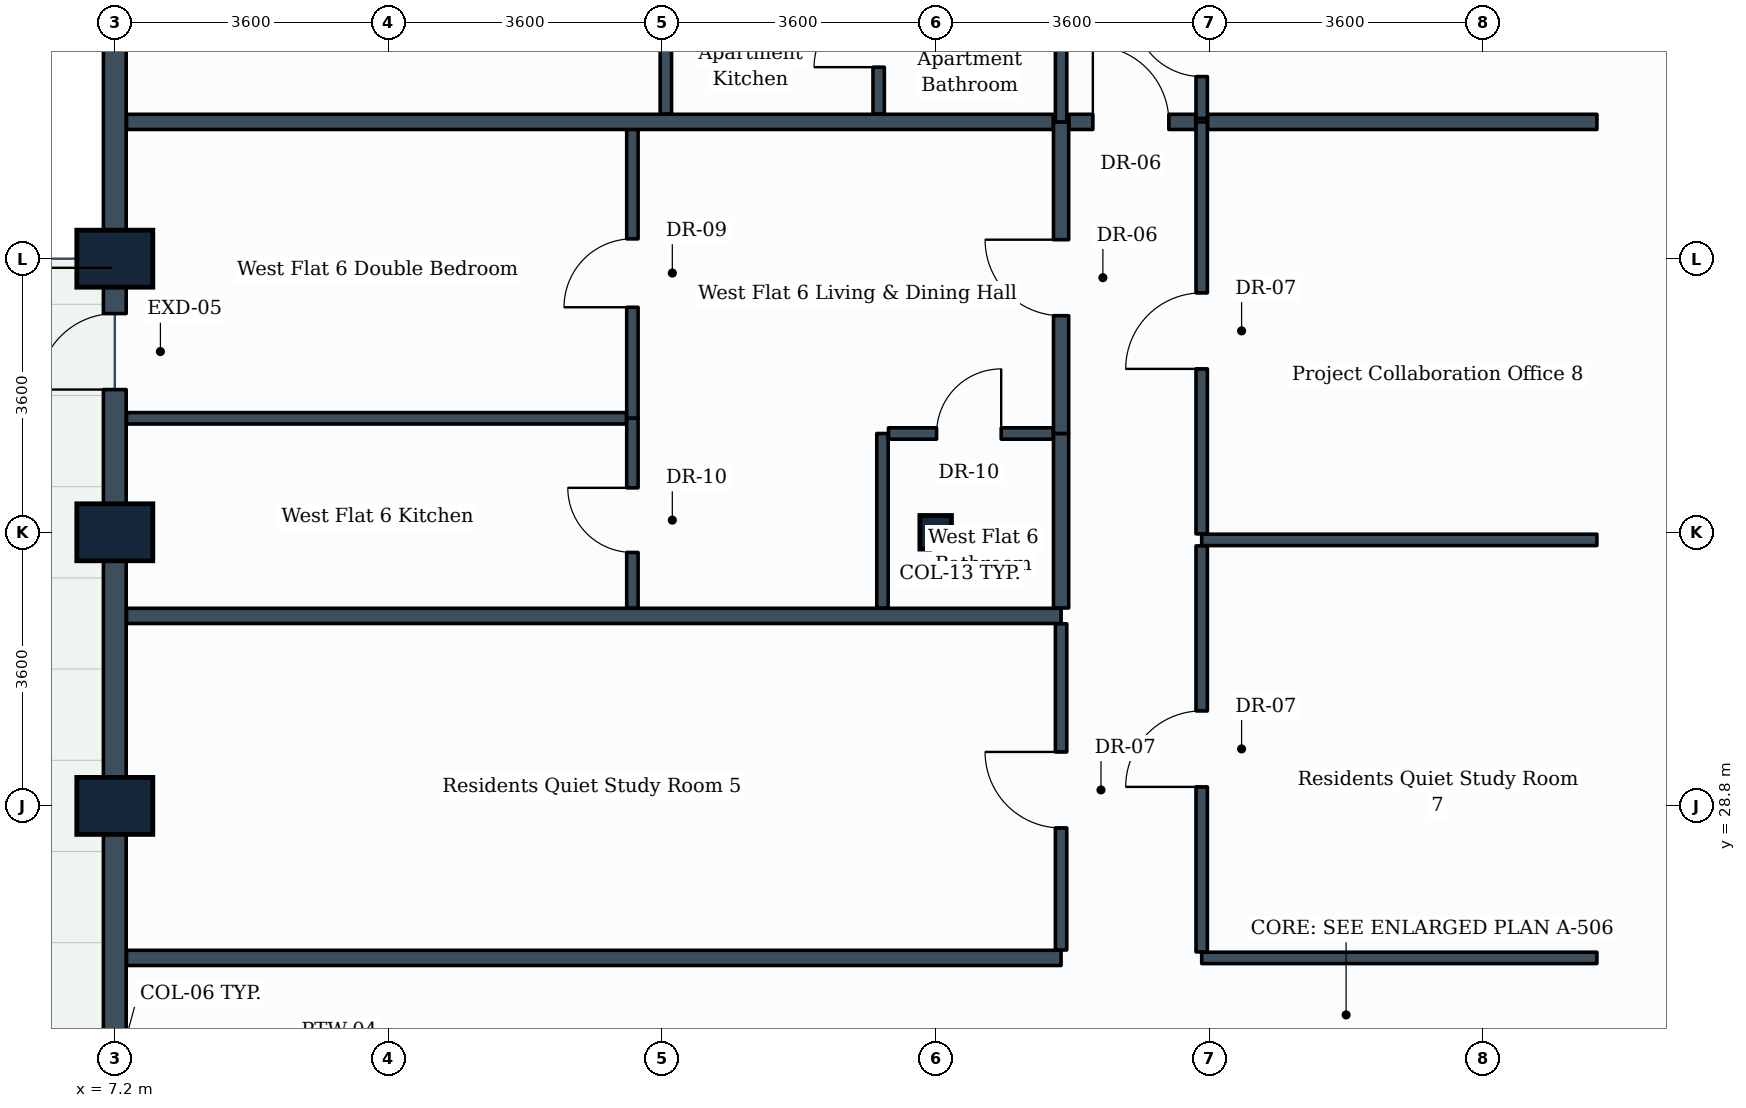
"""IFC4 building model, lengths in metres.
Left out: names, types, materials, properties, quantities, classifications, styles, units other than length and angle.
Written with IfcOpenShell. Run it as: python <this file> out.ifc"""

import sys

from ifc_helpers import new_model, si_unit, direction, frame, frame_2d, origin, origin_2d, place, context, subcontext, project, spatial, rectangle, i_section, extrude, element, fill, save


model = new_model("IFC4")
c1 = context("Model", 3, precision=1e-05, world=origin(), true_north=direction((0.0, 1.0)))
c2 = subcontext(c1, "Body", "Model", "MODEL_VIEW")
j1 = project(units=[si_unit("LENGTHUNIT", "METRE"), si_unit("PLANEANGLEUNIT", "RADIAN")], contexts=[c1])
p1 = place(None, origin())
s1 = spatial("IfcSite", under=j1, at=p1, CompositionType="ELEMENT")
p2 = place(p1, origin())
s2 = spatial("IfcBuilding", under=s1, at=p2, CompositionType="ELEMENT")
p3 = place(p2, frame((0.0, 0.0, 146.6)))
s3 = spatial("IfcBuildingStorey", under=s2, at=p3, CompositionType="ELEMENT", Elevation=146.6)
for number, where, z_axis, x_axis in (
    (1, (7.2, 28.8, 0.0), (0.0, 0.0, 1.0), (0.0, 1.0, 0.0)),
    (2, (7.2, 32.4, 0.0), (0.0, 0.0, 1.0), (0.0, 1.0, 0.0)),
    (3, (7.2, 36.0, 0.0), (0.0, 0.0, 1.0), (0.0, 1.0, 0.0)),
):
    element("IfcColumn", number, at=place(p3, frame(where, z_axis=z_axis, x_axis=x_axis)), inside=s3, PredefinedType="COLUMN", context=c2, shape_type="SweptSolid", body=[
        extrude(rectangle(XDim=0.75, YDim=1.0, at=origin_2d()), origin(), (0.0, 0.0, 1.0), 3.8),
    ])
p4 = place(p3, frame((18.0, 32.4, 0.0), z_axis=(0.0, 0.0, 1.0), x_axis=(1.0, 0.0, 0.0)))
e4 = element("IfcColumn", 4, at=p4, inside=s3, PredefinedType="COLUMN", context=c2, shape_type="SweptSolid", body=[
    extrude(i_section(OverallWidth=0.416, OverallDepth=0.442, WebThickness=0.025, FlangeThickness=0.041, FilletRadius=0.015, at=origin_2d()), origin(), (0.0, 0.0, 1.0), 3.8),
])
p5 = place(p3, frame((7.2, 36.0, 0.0), z_axis=(0.0, 0.0, 1.0), x_axis=(0.0, 1.0, 0.0)))
e5 = element("IfcWall", 5, at=p5, inside=s3, PredefinedType="STANDARD", context=c2, shape_type="SweptSolid", body=[
    extrude(rectangle(XDim=3.6, YDim=0.3, at=frame_2d((1.8, 0.0))), origin(), (0.0, 0.0, 1.0), 2.93),
])
p6 = place(p3, frame((7.2, 32.4, 0.0), z_axis=(0.0, 0.0, 1.0), x_axis=(0.0, 1.0, 0.0)))
e6 = element("IfcWall", 6, at=p6, inside=s3, PredefinedType="STANDARD", context=c2, shape_type="SweptSolid", body=[
    extrude(rectangle(XDim=3.6, YDim=0.3, at=frame_2d((1.8, 0.0))), origin(), (0.0, 0.0, 1.0), 2.93),
])
p7 = place(p6, frame((1.878, 0.0, 0.0)))
e7 = element("IfcOpeningElement", 7, at=p7, cuts=e6, PredefinedType="OPENING", context=c2, shape_type="SweptSolid", body=[
    extrude(rectangle(XDim=1.0, YDim=2.1, at=frame_2d((0.5, 1.05))), frame((0.0, 0.16, 0.0), z_axis=(0.0, -1.0, 0.0), x_axis=(1.0, 0.0, 0.0)), (0.0, 0.0, 1.0), 0.32),
])
p8 = place(p3, frame((7.2, 28.8, 0.0), z_axis=(0.0, 0.0, 1.0), x_axis=(0.0, 1.0, 0.0)))
e8 = element("IfcWall", 8, at=p8, inside=s3, PredefinedType="STANDARD", context=c2, shape_type="SweptSolid", body=[
    extrude(rectangle(XDim=3.6, YDim=0.3, at=frame_2d((1.8, 0.0))), origin(), (0.0, 0.0, 1.0), 2.93),
])
p9 = place(p3, frame((7.2, 25.2, 0.0), z_axis=(0.0, 0.0, 1.0), x_axis=(0.0, 1.0, 0.0)))
e9 = element("IfcWall", 9, at=p9, inside=s3, PredefinedType="STANDARD", context=c2, shape_type="SweptSolid", body=[
    extrude(rectangle(XDim=3.6, YDim=0.3, at=frame_2d((1.8, 0.0))), origin(), (0.0, 0.0, 1.0), 2.93),
])
for number, where, z_axis, x_axis in (
    (10, (7.354, 26.8, 0.0), (0.0, 0.0, 1.0), (1.0, 0.0, 0.0)),
    (11, (7.354, 31.3, 0.0), (0.0, 0.0, 1.0), (1.0, 0.0, 0.0)),
):
    element("IfcWall", number, at=place(p3, frame(where, z_axis=z_axis, x_axis=x_axis)), inside=s3, PredefinedType="PARTITIONING", context=c2, shape_type="SweptSolid", body=[
        extrude(rectangle(XDim=12.296, YDim=0.2, at=frame_2d((6.148, 0.0))), origin(), (0.0, 0.0, 1.0), 2.93),
    ])
p10 = place(p3, frame((19.65, 26.904, 0.0), z_axis=(0.0, 0.0, 1.0), x_axis=(0.0, 1.0, 0.0)))
e12 = element("IfcWall", 12, at=p10, inside=s3, PredefinedType="PARTITIONING", context=c2, shape_type="SweptSolid", body=[
    extrude(rectangle(XDim=4.292, YDim=0.15, at=frame_2d((2.146, 0.0))), origin(), (0.0, 0.0, 1.0), 3.17),
])
p11 = place(p10, frame((1.606, 0.0, 0.0)))
e13 = element("IfcOpeningElement", 13, at=p11, cuts=e12, PredefinedType="OPENING", context=c2, shape_type="SweptSolid", body=[
    extrude(rectangle(XDim=1.0, YDim=2.1, at=frame_2d((0.5, 1.05))), frame((0.0, 0.085, 0.0), z_axis=(0.0, -1.0, 0.0), x_axis=(1.0, 0.0, 0.0)), (0.0, 0.0, 1.0), 0.17),
])
p12 = place(p3, frame((19.65, 31.404, 0.0), z_axis=(0.0, 0.0, 1.0), x_axis=(0.0, 1.0, 0.0)))
e14 = element("IfcWall", 14, at=p12, inside=s3, PredefinedType="PARTITIONING", context=c2, shape_type="SweptSolid", body=[
    extrude(rectangle(XDim=2.296, YDim=0.2, at=frame_2d((1.148, 0.0))), origin(), (0.0, 0.0, 1.0), 3.18),
])
p13 = place(p3, frame((17.3, 31.404, 0.0), z_axis=(0.0, 0.0, 1.0), x_axis=(0.0, 1.0, 0.0)))
e15 = element("IfcWall", 15, at=p13, inside=s3, PredefinedType="PARTITIONING", context=c2, shape_type="SweptSolid", body=[
    extrude(rectangle(XDim=2.296, YDim=0.15, at=frame_2d((1.148, 0.0))), origin(), (0.0, 0.0, 1.0), 3.18),
])
p14 = place(p3, frame((17.379, 33.7, 0.0), z_axis=(0.0, 0.0, 1.0), x_axis=(1.0, 0.0, 0.0)))
e16 = element("IfcWall", 16, at=p14, inside=s3, PredefinedType="PARTITIONING", context=c2, shape_type="SweptSolid", body=[
    extrude(rectangle(XDim=2.167, YDim=0.15, at=frame_2d((1.083, 0.0))), origin(), (0.0, 0.0, 1.0), 3.17),
])
p15 = place(p14, frame((0.633, 0.0, 0.0)))
e17 = element("IfcOpeningElement", 17, at=p15, cuts=e16, PredefinedType="OPENING", context=c2, shape_type="SweptSolid", body=[
    extrude(rectangle(XDim=0.85, YDim=2.1, at=frame_2d((0.425, 1.05))), frame((0.0, 0.085, 0.0), z_axis=(0.0, -1.0, 0.0), x_axis=(1.0, 0.0, 0.0)), (0.0, 0.0, 1.0), 0.17),
])
p16 = place(p3, frame((19.65, 33.7, 0.0), z_axis=(0.0, 0.0, 1.0), x_axis=(0.0, 1.0, 0.0)))
e18 = element("IfcWall", 18, at=p16, inside=s3, PredefinedType="PARTITIONING", context=c2, shape_type="SweptSolid", body=[
    extrude(rectangle(XDim=4.1, YDim=0.2, at=frame_2d((2.05, 0.0))), origin(), (0.0, 0.0, 1.0), 3.17),
])
p17 = place(p16, frame((1.55, 0.0, 0.0)))
e19 = element("IfcOpeningElement", 19, at=p17, cuts=e18, PredefinedType="OPENING", context=c2, shape_type="SweptSolid", body=[
    extrude(rectangle(XDim=1.0, YDim=2.1, at=frame_2d((0.5, 1.05))), frame((0.0, 0.11, 0.0), z_axis=(0.0, -1.0, 0.0), x_axis=(1.0, 0.0, 0.0)), (0.0, 0.0, 1.0), 0.22),
])
p18 = place(p3, frame((14.01, 33.9, 0.0), z_axis=(0.0, 0.0, 1.0), x_axis=(0.0, 1.0, 0.0)))
e20 = element("IfcWall", 20, at=p18, inside=s3, PredefinedType="PARTITIONING", context=c2, shape_type="SweptSolid", body=[
    extrude(rectangle(XDim=3.9, YDim=0.15, at=frame_2d((1.95, 0.0))), origin(), (0.0, 0.0, 1.0), 3.17),
])
p19 = place(p18, frame((1.461, 0.0, 0.0)))
e21 = element("IfcOpeningElement", 21, at=p19, cuts=e20, PredefinedType="OPENING", context=c2, shape_type="SweptSolid", body=[
    extrude(rectangle(XDim=0.9, YDim=2.1, at=frame_2d((0.45, 1.05))), frame((0.0, 0.085, 0.0), z_axis=(0.0, -1.0, 0.0), x_axis=(1.0, 0.0, 0.0)), (0.0, 0.0, 1.0), 0.17),
])
p20 = place(p3, frame((14.01, 31.404, 0.0), z_axis=(0.0, 0.0, 1.0), x_axis=(0.0, 1.0, 0.0)))
e22 = element("IfcWall", 22, at=p20, inside=s3, PredefinedType="PARTITIONING", context=c2, shape_type="SweptSolid", body=[
    extrude(rectangle(XDim=2.496, YDim=0.15, at=frame_2d((1.248, 0.0))), origin(), (0.0, 0.0, 1.0), 3.18),
])
p21 = place(p20, frame((0.731, 0.0, 0.0)))
e23 = element("IfcOpeningElement", 23, at=p21, cuts=e22, PredefinedType="OPENING", context=c2, shape_type="SweptSolid", body=[
    extrude(rectangle(XDim=0.85, YDim=2.1, at=frame_2d((0.425, 1.05))), frame((0.0, 0.085, 0.0), z_axis=(0.0, -1.0, 0.0), x_axis=(1.0, 0.0, 0.0)), (0.0, 0.0, 1.0), 0.17),
])
p22 = place(p3, frame((7.354, 33.9, 0.0), z_axis=(0.0, 0.0, 1.0), x_axis=(1.0, 0.0, 0.0)))
e24 = element("IfcWall", 24, at=p22, inside=s3, PredefinedType="PARTITIONING", context=c2, shape_type="SweptSolid", body=[
    extrude(rectangle(XDim=6.577, YDim=0.15, at=frame_2d((3.289, 0.0))), origin(), (0.0, 0.0, 1.0), 2.93),
])
p23 = place(p3, frame((21.5, 26.8, 0.0), z_axis=(0.0, 0.0, 1.0), x_axis=(1.0, 0.0, 0.0)))
e25 = element("IfcWall", 25, at=p23, inside=s3, PredefinedType="PARTITIONING", context=c2, shape_type="SweptSolid", body=[
    extrude(rectangle(XDim=5.2, YDim=0.15, at=frame_2d((2.6, 0.0))), origin(), (0.0, 0.0, 1.0), 3.535),
])
p24 = place(p3, frame((21.5, 32.3, 0.0), z_axis=(0.0, 0.0, 1.0), x_axis=(1.0, 0.0, 0.0)))
e26 = element("IfcWall", 26, at=p24, inside=s3, PredefinedType="PARTITIONING", context=c2, shape_type="SweptSolid", body=[
    extrude(rectangle(XDim=5.2, YDim=0.15, at=frame_2d((2.6, 0.0))), origin(), (0.0, 0.0, 1.0), 3.18),
])
p25 = place(p3, frame((21.5, 26.879, 0.0), z_axis=(0.0, 0.0, 1.0), x_axis=(0.0, 1.0, 0.0)))
e27 = element("IfcWall", 27, at=p25, inside=s3, PredefinedType="PARTITIONING", context=c2, shape_type="SweptSolid", body=[
    extrude(rectangle(XDim=5.342, YDim=0.15, at=frame_2d((2.671, 0.0))), origin(), (0.0, 0.0, 1.0), 3.13),
])
p26 = place(p25, frame((2.171, 0.0, 0.0)))
e28 = element("IfcOpeningElement", 28, at=p26, cuts=e27, PredefinedType="OPENING", context=c2, shape_type="SweptSolid", body=[
    extrude(rectangle(XDim=1.0, YDim=2.1, at=frame_2d((0.5, 1.05))), frame((0.0, 0.085, 0.0), z_axis=(0.0, -1.0, 0.0), x_axis=(1.0, 0.0, 0.0)), (0.0, 0.0, 1.0), 0.17),
])
p27 = place(p3, frame((21.5, 32.379, 0.0), z_axis=(0.0, 0.0, 1.0), x_axis=(0.0, 1.0, 0.0)))
e29 = element("IfcWall", 29, at=p27, inside=s3, PredefinedType="PARTITIONING", context=c2, shape_type="SweptSolid", body=[
    extrude(rectangle(XDim=5.421, YDim=0.15, at=frame_2d((2.71, 0.0))), origin(), (0.0, 0.0, 1.0), 3.17),
])
p28 = place(p27, frame((2.171, 0.0, 0.0)))
e30 = element("IfcOpeningElement", 30, at=p28, cuts=e29, PredefinedType="OPENING", context=c2, shape_type="SweptSolid", body=[
    extrude(rectangle(XDim=1.0, YDim=2.1, at=frame_2d((0.5, 1.05))), frame((0.0, 0.085, 0.0), z_axis=(0.0, -1.0, 0.0), x_axis=(1.0, 0.0, 0.0)), (0.0, 0.0, 1.0), 0.17),
])
p29 = place(p3, frame((7.354, 37.8, 0.0), z_axis=(0.0, 0.0, 1.0), x_axis=(1.0, 0.0, 0.0)))
e31 = element("IfcWall", 31, at=p29, inside=s3, PredefinedType="PARTITIONING", context=c2, shape_type="SweptSolid", body=[
    extrude(rectangle(XDim=12.192, YDim=0.2, at=frame_2d((6.096, 0.0))), origin(), (0.0, 0.0, 1.0), 2.93),
])
p30 = place(p3, frame((21.579, 37.8, 0.0), z_axis=(0.0, 0.0, 1.0), x_axis=(1.0, 0.0, 0.0)))
e32 = element("IfcWall", 32, at=p30, inside=s3, PredefinedType="PARTITIONING", context=c2, shape_type="SweptSolid", body=[
    extrude(rectangle(XDim=5.121, YDim=0.2, at=frame_2d((2.561, 0.0))), origin(), (0.0, 0.0, 1.0), 3.535),
])
p31 = place(p3, frame((19.754, 37.8, 0.0), z_axis=(0.0, 0.0, 1.0), x_axis=(1.0, 0.0, 0.0)))
e33 = element("IfcWall", 33, at=p31, inside=s3, PredefinedType="PARTITIONING", context=c2, shape_type="SweptSolid", body=[
    extrude(rectangle(XDim=1.667, YDim=0.2, at=frame_2d((0.833, 0.0))), origin(), (0.0, 0.0, 1.0), 3.535),
])
p32 = place(p31, frame((0.314, 0.0, 0.0)))
e34 = element("IfcOpeningElement", 34, at=p32, cuts=e33, PredefinedType="OPENING", context=c2, shape_type="SweptSolid", body=[
    extrude(rectangle(XDim=1.0, YDim=2.1, at=frame_2d((0.5, 1.05))), frame((0.0, 0.11, 0.0), z_axis=(0.0, -1.0, 0.0), x_axis=(1.0, 0.0, 0.0)), (0.0, 0.0, 1.0), 0.22),
])
p33 = place(p3, frame((19.65, 37.8, 0.0), z_axis=(0.0, 0.0, 1.0), x_axis=(0.0, 1.0, 0.0)))
e35 = element("IfcWall", 35, at=p33, inside=s3, PredefinedType="PARTITIONING", context=c2, shape_type="SweptSolid", body=[
    extrude(rectangle(XDim=2.35, YDim=0.15, at=frame_2d((1.175, 0.0))), origin(), (0.0, 0.0, 1.0), 3.535),
])
p34 = place(p3, frame((17.25, 37.904, 0.0), z_axis=(0.0, 0.0, 1.0), x_axis=(0.0, 1.0, 0.0)))
e36 = element("IfcWall", 36, at=p34, inside=s3, PredefinedType="PARTITIONING", context=c2, shape_type="SweptSolid", body=[
    extrude(rectangle(XDim=2.246, YDim=0.15, at=frame_2d((1.123, 0.0))), origin(), (0.0, 0.0, 1.0), 3.535),
])
p35 = place(p34, frame((0.616, 0.0, 0.0)))
e37 = element("IfcOpeningElement", 37, at=p35, cuts=e36, PredefinedType="OPENING", context=c2, shape_type="SweptSolid", body=[
    extrude(rectangle(XDim=0.85, YDim=2.1, at=frame_2d((0.425, 1.05))), frame((0.0, 0.085, 0.0), z_axis=(0.0, -1.0, 0.0), x_axis=(1.0, 0.0, 0.0)), (0.0, 0.0, 1.0), 0.17),
])
p36 = place(p3, frame((21.5, 37.846, 0.0), z_axis=(0.0, 0.0, 1.0), x_axis=(0.0, 1.0, 0.0)))
e38 = element("IfcWall", 38, at=p36, inside=s3, PredefinedType="PARTITIONING", context=c2, shape_type="SweptSolid", body=[
    extrude(rectangle(XDim=5.2, YDim=0.15, at=frame_2d((2.6, 0.0))), origin(), (0.0, 0.0, 1.0), 2.93),
])
p37 = place(p36, frame((0.55, 0.0, 0.0)))
e39 = element("IfcOpeningElement", 39, at=p37, cuts=e38, PredefinedType="OPENING", context=c2, shape_type="SweptSolid", body=[
    extrude(rectangle(XDim=0.9, YDim=2.1, at=frame_2d((0.45, 1.05))), frame((0.0, 0.085, 0.0), z_axis=(0.0, -1.0, 0.0), x_axis=(1.0, 0.0, 0.0)), (0.0, 0.0, 1.0), 0.17),
])
p38 = place(p3, frame((14.45, 37.904, 0.0), z_axis=(0.0, 0.0, 1.0), x_axis=(0.0, 1.0, 0.0)))
e40 = element("IfcWall", 40, at=p38, inside=s3, PredefinedType="PARTITIONING", context=c2, shape_type="SweptSolid", body=[
    extrude(rectangle(XDim=2.246, YDim=0.15, at=frame_2d((1.123, 0.0))), origin(), (0.0, 0.0, 1.0), 3.535),
])
p39 = place(p7, origin())
e41 = element("IfcDoor", 41, at=p39, inside=s3, OperationType="SINGLE_SWING_LEFT", PredefinedType="DOOR", context=c2, shape_type="SweptSolid", body=[
    extrude(rectangle(XDim=1.0, YDim=2.1, at=frame_2d((0.5, 1.05))), frame((0.0, 0.025, 0.0), z_axis=(0.0, -1.0, 0.0), x_axis=(1.0, 0.0, 0.0)), (0.0, 0.0, 1.0), 0.05),
])
fill(e7, e41)
p40 = place(p11, origin())
e42 = element("IfcDoor", 42, at=p40, inside=s3, OperationType="SINGLE_SWING_RIGHT", PredefinedType="DOOR", context=c2, shape_type="SweptSolid", body=[
    extrude(rectangle(XDim=1.0, YDim=2.1, at=frame_2d((0.5, 1.05))), frame((0.0, 0.025, 0.0), z_axis=(0.0, -1.0, 0.0), x_axis=(1.0, 0.0, 0.0)), (0.0, 0.0, 1.0), 0.05),
])
fill(e13, e42)
p41 = place(p15, origin())
e43 = element("IfcDoor", 43, at=p41, inside=s3, OperationType="SINGLE_SWING_RIGHT", PredefinedType="DOOR", context=c2, shape_type="SweptSolid", body=[
    extrude(rectangle(XDim=0.85, YDim=2.1, at=frame_2d((0.425, 1.05))), frame((0.0, 0.025, 0.0), z_axis=(0.0, -1.0, 0.0), x_axis=(1.0, 0.0, 0.0)), (0.0, 0.0, 1.0), 0.05),
])
fill(e17, e43)
p42 = place(p17, origin())
e44 = element("IfcDoor", 44, at=p42, inside=s3, OperationType="SINGLE_SWING_RIGHT", PredefinedType="DOOR", context=c2, shape_type="SweptSolid", body=[
    extrude(rectangle(XDim=1.0, YDim=2.1, at=frame_2d((0.5, 1.05))), frame((0.0, 0.025, 0.0), z_axis=(0.0, -1.0, 0.0), x_axis=(1.0, 0.0, 0.0)), (0.0, 0.0, 1.0), 0.05),
])
fill(e19, e44)
p43 = place(p19, origin())
e45 = element("IfcDoor", 45, at=p43, inside=s3, OperationType="SINGLE_SWING_LEFT", PredefinedType="DOOR", context=c2, shape_type="SweptSolid", body=[
    extrude(rectangle(XDim=0.9, YDim=2.1, at=frame_2d((0.45, 1.05))), frame((0.0, 0.025, 0.0), z_axis=(0.0, -1.0, 0.0), x_axis=(1.0, 0.0, 0.0)), (0.0, 0.0, 1.0), 0.05),
])
fill(e21, e45)
p44 = place(p21, origin())
e46 = element("IfcDoor", 46, at=p44, inside=s3, OperationType="SINGLE_SWING_RIGHT", PredefinedType="DOOR", context=c2, shape_type="SweptSolid", body=[
    extrude(rectangle(XDim=0.85, YDim=2.1, at=frame_2d((0.425, 1.05))), frame((0.0, 0.025, 0.0), z_axis=(0.0, -1.0, 0.0), x_axis=(1.0, 0.0, 0.0)), (0.0, 0.0, 1.0), 0.05),
])
fill(e23, e46)
p45 = place(p26, origin())
e47 = element("IfcDoor", 47, at=p45, inside=s3, OperationType="SINGLE_SWING_LEFT", PredefinedType="DOOR", context=c2, shape_type="SweptSolid", body=[
    extrude(rectangle(XDim=1.0, YDim=2.1, at=frame_2d((0.5, 1.05))), frame((0.0, 0.025, 0.0), z_axis=(0.0, -1.0, 0.0), x_axis=(1.0, 0.0, 0.0)), (0.0, 0.0, 1.0), 0.05),
])
fill(e28, e47)
p46 = place(p28, origin())
e48 = element("IfcDoor", 48, at=p46, inside=s3, OperationType="SINGLE_SWING_LEFT", PredefinedType="DOOR", context=c2, shape_type="SweptSolid", body=[
    extrude(rectangle(XDim=1.0, YDim=2.1, at=frame_2d((0.5, 1.05))), frame((0.0, 0.025, 0.0), z_axis=(0.0, -1.0, 0.0), x_axis=(1.0, 0.0, 0.0)), (0.0, 0.0, 1.0), 0.05),
])
fill(e30, e48)
p47 = place(p32, origin())
e49 = element("IfcDoor", 49, at=p47, inside=s3, OperationType="SINGLE_SWING_LEFT", PredefinedType="DOOR", context=c2, shape_type="SweptSolid", body=[
    extrude(rectangle(XDim=1.0, YDim=2.1, at=frame_2d((0.5, 1.05))), frame((0.0, 0.025, 0.0), z_axis=(0.0, -1.0, 0.0), x_axis=(1.0, 0.0, 0.0)), (0.0, 0.0, 1.0), 0.05),
])
fill(e34, e49)
p48 = place(p35, origin())
e50 = element("IfcDoor", 50, at=p48, inside=s3, OperationType="SINGLE_SWING_LEFT", PredefinedType="DOOR", context=c2, shape_type="SweptSolid", body=[
    extrude(rectangle(XDim=0.85, YDim=2.1, at=frame_2d((0.425, 1.05))), frame((0.0, 0.025, 0.0), z_axis=(0.0, -1.0, 0.0), x_axis=(1.0, 0.0, 0.0)), (0.0, 0.0, 1.0), 0.05),
])
fill(e37, e50)
p49 = place(p37, origin())
e51 = element("IfcDoor", 51, at=p49, inside=s3, OperationType="SINGLE_SWING_RIGHT", PredefinedType="DOOR", context=c2, shape_type="SweptSolid", body=[
    extrude(rectangle(XDim=0.9, YDim=2.1, at=frame_2d((0.45, 1.05))), frame((0.0, 0.025, 0.0), z_axis=(0.0, -1.0, 0.0), x_axis=(1.0, 0.0, 0.0)), (0.0, 0.0, 1.0), 0.05),
])
fill(e39, e51)
save(model, sys.argv[1])
